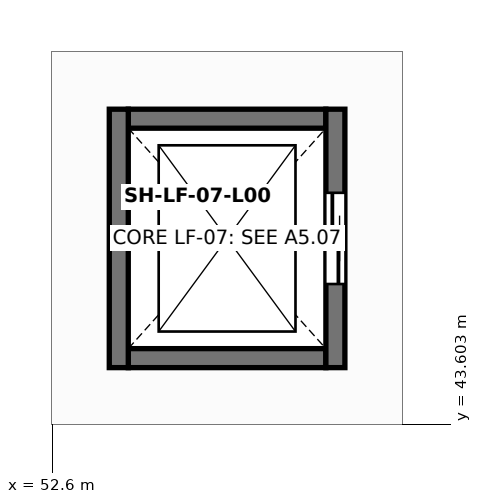
"""IFC4 building model, lengths in metres.
Left out: names, types, materials, properties, quantities, classifications, styles, units other than length and angle.
Written with IfcOpenShell. Run it as: python <this file> out.ifc"""

import sys

from ifc_helpers import new_model, si_unit, direction, frame, frame_2d, origin, place, context, subcontext, project, spatial, rectangle, extrude, element, fill, save


model = new_model("IFC4")
c1 = context("Model", 3, precision=1e-05, world=origin(), true_north=direction((0.0, 1.0)))
c2 = subcontext(c1, "Body", "Model", "MODEL_VIEW")
j1 = project(units=[si_unit("LENGTHUNIT", "METRE"), si_unit("PLANEANGLEUNIT", "RADIAN")], contexts=[c1])
p1 = place(None, origin())
s1 = spatial("IfcSite", under=j1, at=p1, CompositionType="ELEMENT")
p2 = place(p1, origin())
s2 = spatial("IfcBuilding", under=s1, at=p2, CompositionType="ELEMENT")
p3 = place(p2, origin())
s3 = spatial("IfcBuildingStorey", under=s2, at=p3, CompositionType="ELEMENT", Elevation=0.0)
for number, where, z_axis, x_axis in (
    (1, (53.6, 44.475, 0.0), (0.0, 0.0, 1.0), (1.0, 0.0, 0.0)),
    (2, (56.2, 47.625, 0.0), (0.0, 0.0, 1.0), (-1.0, 0.0, 0.0)),
):
    element("IfcWall", number, at=place(p3, frame(where, z_axis=z_axis, x_axis=x_axis)), inside=s3, PredefinedType="SOLIDWALL", context=c2, shape_type="SweptSolid", body=[
        extrude(rectangle(XDim=2.6, YDim=0.25, at=frame_2d((1.3, 0.0))), origin(), (0.0, 0.0, 1.0), 5.735),
    ])
p4 = place(p3, frame((56.325, 44.35, 0.0), z_axis=(0.0, 0.0, 1.0), x_axis=(0.0, 1.0, 0.0)))
e3 = element("IfcWall", 3, at=p4, inside=s3, PredefinedType="SOLIDWALL", context=c2, shape_type="SweptSolid", body=[
    extrude(rectangle(XDim=3.4, YDim=0.25, at=frame_2d((1.7, 0.0))), origin(), (0.0, 0.0, 1.0), 5.735),
])
p5 = place(p4, frame((1.1, 0.0, 0.0)))
e4 = element("IfcOpeningElement", 4, at=p5, cuts=e3, PredefinedType="OPENING", context=c2, shape_type="SweptSolid", body=[
    extrude(rectangle(XDim=1.2, YDim=2.2, at=frame_2d((0.6, 1.1))), frame((0.0, 0.135, 0.0), z_axis=(0.0, -1.0, 0.0), x_axis=(1.0, 0.0, 0.0)), (0.0, 0.0, 1.0), 0.27),
])
p6 = place(p3, frame((53.475, 47.75, 0.0), z_axis=(0.0, 0.0, 1.0), x_axis=(0.0, -1.0, 0.0)))
e5 = element("IfcWall", 5, at=p6, inside=s3, PredefinedType="SOLIDWALL", context=c2, shape_type="SweptSolid", body=[
    extrude(rectangle(XDim=3.4, YDim=0.25, at=frame_2d((1.7, 0.0))), origin(), (0.0, 0.0, 1.0), 5.735),
])
p7 = place(p5, frame((1.2, 0.0, 0.0), z_axis=(0.0, 0.0, 1.0), x_axis=(-1.0, 0.0, 0.0)))
e6 = element("IfcDoor", 6, at=p7, inside=s3, OperationType="DOUBLE_DOOR_SLIDING", PredefinedType="DOOR", context=c2, shape_type="SweptSolid", body=[
    extrude(rectangle(XDim=1.2, YDim=2.2, at=frame_2d((0.6, 1.1))), frame((0.0, 0.025, 0.0), z_axis=(0.0, -1.0, 0.0), x_axis=(1.0, 0.0, 0.0)), (0.0, 0.0, 1.0), 0.05),
])
fill(e4, e6)
save(model, sys.argv[1])
